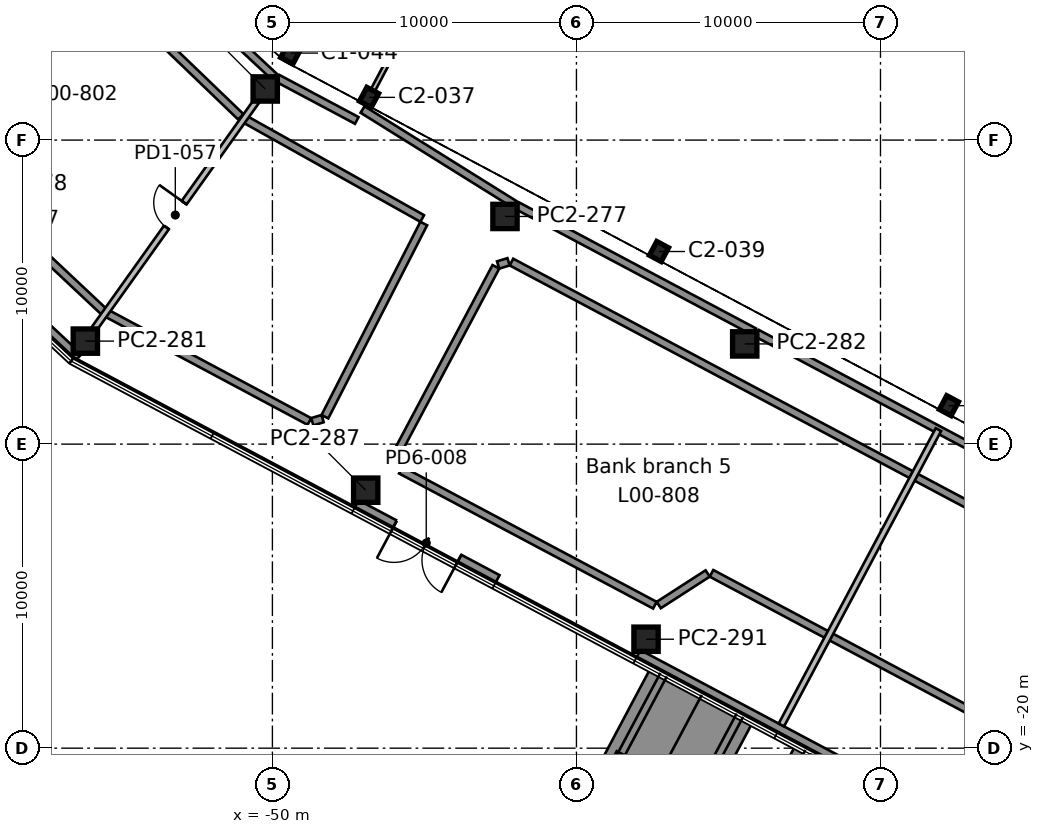
"""IFC4 building model, lengths in metres.
Left out: names, types, materials, properties, quantities, classifications, styles, units other than length and angle.
Written with IfcOpenShell. Run it as: python <this file> out.ifc"""

import sys

from ifc_helpers import new_model, si_unit, direction, frame, frame_2d, origin, origin_2d, place, context, subcontext, project, spatial, rectangle, i_section, extrude, element, fill, save


model = new_model("IFC4")
c1 = context("Model", 3, precision=1e-05, world=origin(), true_north=direction((0.0, 1.0)))
c2 = subcontext(c1, "Body", "Model", "MODEL_VIEW")
j1 = project(units=[si_unit("LENGTHUNIT", "METRE"), si_unit("PLANEANGLEUNIT", "RADIAN")], contexts=[c1])
p1 = place(None, origin())
s1 = spatial("IfcSite", under=j1, at=p1, CompositionType="ELEMENT")
p2 = place(p1, origin())
s2 = spatial("IfcBuilding", under=s1, at=p2, CompositionType="ELEMENT")
p3 = place(p2, origin())
s3 = spatial("IfcBuildingStorey", under=s2, at=p3, CompositionType="ELEMENT", Elevation=0.0)
for number, where, z_axis, x_axis in (
    (1, (-27.749, -8.735, 0.0), (0.0, 0.0, 1.0), (0.883, -0.469, 0.0)),
    (2, (-37.285, -3.665, 0.0), (0.0, 0.0, 1.0), (0.883, -0.469, 0.0)),
    (3, (-46.821, 1.405, 0.0), (0.0, 0.0, 1.0), (0.883, -0.469, 0.0)),
):
    element("IfcColumn", number, at=place(p3, frame(where, z_axis=z_axis, x_axis=x_axis)), inside=s3, PredefinedType="COLUMN", context=c2, shape_type="SweptSolid", body=[
        extrude(i_section(OverallWidth=0.437, OverallDepth=0.513, WebThickness=0.061, FlangeThickness=0.097, FilletRadius=0.015, at=origin_2d()), origin(), (0.0, 0.0, 1.0), 7.0),
    ])
p4 = place(p3, frame((-49.394, 2.861, 0.0), z_axis=(0.0, 0.0, 1.0), x_axis=(0.882947592859, -0.469471562786, 0.0)))
e4 = element("IfcColumn", 4, at=p4, inside=s3, PredefinedType="COLUMN", context=c2, shape_type="SweptSolid", body=[
    extrude(i_section(OverallWidth=0.455, OverallDepth=0.569, WebThickness=0.078, FlangeThickness=0.125, FilletRadius=0.015, at=origin_2d()), origin(), (0.0, 0.0, 1.0), 7.0),
])
p5 = place(p3, frame((-22.937, 1.38, 0.0), z_axis=(0.0, 0.0, 1.0), x_axis=(-0.88295276571, 0.46946183394, 0.0)))
e5 = element("IfcWall", 5, at=p5, inside=s3, PredefinedType="SHEAR", context=c2, shape_type="SweptSolid", body=[
    extrude(rectangle(XDim=20.2, YDim=0.9, at=frame_2d((10.1, 0.0))), origin(), (0.0, 0.0, 1.0), 7.0),
])
for number, where, z_axis, x_axis in (
    (6, (-37.711, -16.417, 0.0), (0.0, 0.0, 1.0), (1.0, 0.0, 0.0)),
    (7, (-46.931, -11.515, 0.0), (0.0, 0.0, 1.0), (1.0, 0.0, 0.0)),
    (8, (-34.465, -6.704, 0.0), (0.0, 0.0, 1.0), (1.0, 0.0, 0.0)),
    (9, (-56.152, -6.612, 0.0), (0.0, 0.0, 1.0), (1.0, 0.0, 0.0)),
    (10, (-42.35, -2.512, 0.0), (0.0, 0.0, 1.0), (1.0, 0.0, 0.0)),
    (11, (-50.236, 1.681, 0.0), (0.0, 0.0, 1.0), (1.0, 0.0, 0.0)),
):
    element("IfcColumn", number, at=place(p3, frame(where, z_axis=z_axis, x_axis=x_axis)), inside=s3, PredefinedType="COLUMN", context=c2, shape_type="SweptSolid", body=[
        extrude(rectangle(XDim=0.8, YDim=0.8, at=origin_2d()), origin(), (0.0, 0.0, 1.0), 6.37),
    ])
p6 = place(p3, frame((-67.902, 3.524, 0.0), z_axis=(0.0, 0.0, 1.0), x_axis=(0.731345713801, -0.682006925848, 0.0)))
e12 = element("IfcWall", 12, at=p6, inside=s3, PredefinedType="SOLIDWALL", context=c2, shape_type="SweptSolid", body=[
    extrude(rectangle(XDim=15.706, YDim=0.4, at=frame_2d((7.853, 0.0))), origin(), (0.0, 0.0, 1.0), 6.37),
])
p7 = place(p6, frame((1.357, 0.0, 0.0)))
e13 = element("IfcOpeningElement", 13, at=p7, cuts=e12, PredefinedType="OPENING", context=c2, shape_type="SweptSolid", body=[
    extrude(rectangle(XDim=2.4, YDim=2.4, at=frame_2d((1.2, 1.2))), frame((0.0, 0.21, 0.0), z_axis=(0.0, -1.0, 0.0), x_axis=(1.0, 0.0, 0.0)), (0.0, 0.0, 1.0), 0.42),
])
p8 = place(p6, frame((6.579, 0.0, 0.0)))
e14 = element("IfcOpeningElement", 14, at=p8, cuts=e12, PredefinedType="OPENING", context=c2, shape_type="SweptSolid", body=[
    extrude(rectangle(XDim=2.4, YDim=2.4, at=frame_2d((1.2, 1.2))), frame((0.0, 0.21, 0.0), z_axis=(0.0, -1.0, 0.0), x_axis=(1.0, 0.0, 0.0)), (0.0, 0.0, 1.0), 0.42),
])
p9 = place(p6, frame((11.801, 0.0, 0.0)))
e15 = element("IfcOpeningElement", 15, at=p9, cuts=e12, PredefinedType="OPENING", context=c2, shape_type="SweptSolid", body=[
    extrude(rectangle(XDim=2.4, YDim=2.4, at=frame_2d((1.2, 1.2))), frame((0.0, 0.21, 0.0), z_axis=(0.0, -1.0, 0.0), x_axis=(1.0, 0.0, 0.0)), (0.0, 0.0, 1.0), 0.42),
])
p10 = place(p3, frame((-47.257, -12.021, 0.0), z_axis=(0.0, 0.0, 1.0), x_axis=(0.882945827299, -0.469474883307, 0.0)))
e16 = element("IfcWall", 16, at=p10, inside=s3, PredefinedType="SOLIDWALL", context=c2, shape_type="SweptSolid", body=[
    extrude(rectangle(XDim=5.249, YDim=0.4, at=frame_2d((2.624, 0.0))), origin(), (0.0, 0.0, 1.0), 6.37),
])
p11 = place(p10, frame((1.425, 0.0, 0.0)))
e17 = element("IfcOpeningElement", 17, at=p11, cuts=e16, PredefinedType="OPENING", context=c2, shape_type="SweptSolid", body=[
    extrude(rectangle(XDim=2.4, YDim=2.4, at=frame_2d((1.2, 1.2))), frame((0.0, 0.21, 0.0), z_axis=(0.0, -1.0, 0.0), x_axis=(1.0, 0.0, 0.0)), (0.0, 0.0, 1.0), 0.42),
])
p12 = place(p3, frame((-37.988, -16.95, 0.0), z_axis=(0.0, 0.0, 1.0), x_axis=(0.882951258831, -0.469464668029, 0.0)))
e18 = element("IfcWall", 18, at=p12, inside=s3, PredefinedType="SOLIDWALL", context=c2, shape_type="SweptSolid", body=[
    extrude(rectangle(XDim=20.996, YDim=0.4, at=frame_2d((10.498, 0.0))), origin(), (0.0, 0.0, 1.0), 6.37),
])
p13 = place(p12, frame((17.171, 0.0, 0.0)))
e19 = element("IfcOpeningElement", 19, at=p13, cuts=e18, PredefinedType="OPENING", context=c2, shape_type="SweptSolid", body=[
    extrude(rectangle(XDim=2.4, YDim=2.4, at=frame_2d((1.2, 1.2))), frame((0.0, 0.21, 0.0), z_axis=(0.0, -1.0, 0.0), x_axis=(1.0, 0.0, 0.0)), (0.0, 0.0, 1.0), 0.42),
])
p14 = place(p3, frame((-36.605, -17.912, 0.0), z_axis=(0.0, 0.0, 1.0), x_axis=(-0.469411791251, -0.882979371353, 0.0)))
e20 = element("IfcWall", 20, at=p14, inside=s3, PredefinedType="SOLIDWALL", context=c2, shape_type="SweptSolid", body=[
    extrude(rectangle(XDim=3.2, YDim=1.6, at=frame_2d((1.6, 0.0))), origin(), (0.0, 0.0, 1.0), 6.75),
])
p15 = place(p3, frame((-35.192, -18.663, 0.0), z_axis=(0.0, 0.0, 1.0), x_axis=(-0.469471267677, -0.882947749771, 0.0)))
e21 = element("IfcWall", 21, at=p15, inside=s3, PredefinedType="SOLIDWALL", context=c2, shape_type="SweptSolid", body=[
    extrude(rectangle(XDim=1.6, YDim=1.6, at=frame_2d((0.8, 0.0))), origin(), (0.0, 0.0, 1.0), 6.75),
])
p16 = place(p3, frame((-35.943, -20.076, 0.0), z_axis=(0.0, 0.0, 1.0), x_axis=(-0.469534519898, -0.882914115089, 0.0)))
e22 = element("IfcWall", 22, at=p16, inside=s3, PredefinedType="SOLIDWALL", context=c2, shape_type="SweptSolid", body=[
    extrude(rectangle(XDim=1.6, YDim=1.6, at=frame_2d((0.8, 0.0))), origin(), (0.0, 0.0, 1.0), 6.75),
])
p17 = place(p3, frame((-37.444, -17.466, 0.0), z_axis=(0.0, 0.0, 1.0), x_axis=(-0.469434248776, -0.882967432059, 0.0)))
e23 = element("IfcWall", 23, at=p17, inside=s3, PredefinedType="SOLIDWALL", context=c2, shape_type="SweptSolid", body=[
    extrude(rectangle(XDim=2.9, YDim=0.3, at=frame_2d((1.45, 0.0))), origin(), (0.0, 0.0, 1.0), 7.0),
])
p18 = place(p3, frame((-38.805, -20.026, 0.0), z_axis=(0.0, 0.0, 1.0), x_axis=(-0.469534121713, -0.882914326844, 0.0)))
e24 = element("IfcWall", 24, at=p18, inside=s3, PredefinedType="SOLIDWALL", context=c2, shape_type="SweptSolid", body=[
    extrude(rectangle(XDim=1.9, YDim=0.3, at=frame_2d((0.95, 0.0))), origin(), (0.0, 0.0, 1.0), 7.0),
])
p19 = place(p3, frame((-34.353, -19.109, 0.0), z_axis=(0.0, 0.0, 1.0), x_axis=(-0.469434248776, -0.882967432059, 0.0)))
e25 = element("IfcWall", 25, at=p19, inside=s3, PredefinedType="SOLIDWALL", context=c2, shape_type="SweptSolid", body=[
    extrude(rectangle(XDim=2.9, YDim=0.3, at=frame_2d((1.45, 0.0))), origin(), (0.0, 0.0, 1.0), 7.0),
])
p20 = place(p3, frame((-31.837, -20.447, 0.0), z_axis=(0.0, 0.0, 1.0), x_axis=(-0.46947503999, -0.882945743988, 0.0)))
e26 = element("IfcWall", 26, at=p20, inside=s3, PredefinedType="SOLIDWALL", context=c2, shape_type="SweptSolid", body=[
    extrude(rectangle(XDim=3.2, YDim=1.6, at=frame_2d((1.6, 0.0))), origin(), (0.0, 0.0, 1.0), 6.75),
])
p21 = place(p3, frame((-32.676, -20.001, 0.0), z_axis=(0.0, 0.0, 1.0), x_axis=(-0.469534780786, -0.882913976349, 0.0)))
e27 = element("IfcWall", 27, at=p21, inside=s3, PredefinedType="SOLIDWALL", context=c2, shape_type="SweptSolid", body=[
    extrude(rectangle(XDim=2.9, YDim=0.3, at=frame_2d((1.45, 0.0))), origin(), (0.0, 0.0, 1.0), 7.0),
])
p22 = place(p3, frame((-23.159, -20.845, 7.0), z_axis=(0.0, 0.0, 1.0), x_axis=(-0.882863954687, 0.469628829518, 0.0)))
e28 = element("IfcWall", 28, at=p22, inside=s3, PredefinedType="STANDARD", context=c2, shape_type="SweptSolid", body=[
    extrude(rectangle(XDim=14.044, YDim=0.25, at=frame_2d((7.022, 0.0))), origin(), (0.0, 0.0, 1.0), 0.65),
])
p23 = place(p3, frame((-35.684, -14.255, 7.0), z_axis=(0.0, 0.0, 1.0), x_axis=(-0.840369713359, -0.542013602107, 0.0)))
e29 = element("IfcWall", 29, at=p23, inside=s3, PredefinedType="STANDARD", context=c2, shape_type="SweptSolid", body=[
    extrude(rectangle(XDim=1.915, YDim=0.25, at=frame_2d((0.958, 0.0))), origin(), (0.0, 0.0, 1.0), 0.65),
])
p24 = place(p3, frame((-37.42, -15.298, 7.0), z_axis=(0.0, 0.0, 1.0), x_axis=(-0.882939968374, 0.469485902076, 0.0)))
e30 = element("IfcWall", 30, at=p24, inside=s3, PredefinedType="STANDARD", context=c2, shape_type="SweptSolid", body=[
    extrude(rectangle(XDim=9.464, YDim=0.25, at=frame_2d((4.732, 0.0))), origin(), (0.0, 0.0, 1.0), 0.65),
])
p25 = place(p3, frame((-45.837, -10.781, 7.0), z_axis=(0.0, 0.0, 1.0), x_axis=(-0.292218535599, 0.956351571051, 0.0)))
e31 = element("IfcWall", 31, at=p25, inside=s3, PredefinedType="STANDARD", context=c2, shape_type="SweptSolid", body=[
    extrude(rectangle(XDim=0.358, YDim=0.25, at=frame_2d((0.179, 0.0))), origin(), (0.0, 0.0, 1.0), 0.65),
])
p26 = place(p3, frame((-45.932, -10.343, 7.0), z_axis=(0.0, 0.0, 1.0), x_axis=(0.469458954787, 0.882954296535, 0.0)))
e32 = element("IfcWall", 32, at=p26, inside=s3, PredefinedType="STANDARD", context=c2, shape_type="SweptSolid", body=[
    extrude(rectangle(XDim=6.993, YDim=0.25, at=frame_2d((3.497, 0.0))), origin(), (0.0, 0.0, 1.0), 0.65),
])
p27 = place(p3, frame((-42.576, -4.108, 7.0), z_axis=(0.0, 0.0, 1.0), x_axis=(0.956409679833, 0.2920282937, 0.0)))
e33 = element("IfcWall", 33, at=p27, inside=s3, PredefinedType="STANDARD", context=c2, shape_type="SweptSolid", body=[
    extrude(rectangle(XDim=0.359, YDim=0.25, at=frame_2d((0.179, 0.0))), origin(), (0.0, 0.0, 1.0), 0.65),
])
p28 = place(p3, frame((-42.137, -4.012, 7.0), z_axis=(0.0, 0.0, 1.0), x_axis=(0.882945698561, -0.469475125424, 0.0)))
e34 = element("IfcWall", 34, at=p28, inside=s3, PredefinedType="STANDARD", context=c2, shape_type="SweptSolid", body=[
    extrude(rectangle(XDim=28.492, YDim=0.25, at=frame_2d((14.246, 0.0))), origin(), (0.0, 0.0, 1.0), 0.65),
])
p29 = place(p3, frame((-48.348, -9.161, 7.0), z_axis=(0.0, 0.0, 1.0), x_axis=(-0.956340919112, -0.292253394219, 0.0)))
e35 = element("IfcWall", 35, at=p29, inside=s3, PredefinedType="STANDARD", context=c2, shape_type="SweptSolid", body=[
    extrude(rectangle(XDim=0.356, YDim=0.25, at=frame_2d((0.178, 0.0))), origin(), (0.0, 0.0, 1.0), 0.65),
])
p30 = place(p3, frame((-48.784, -9.255, 7.0), z_axis=(0.0, 0.0, 1.0), x_axis=(-0.882115498976, 0.471033169178, 0.0)))
e36 = element("IfcWall", 36, at=p30, inside=s3, PredefinedType="STANDARD", context=c2, shape_type="SweptSolid", body=[
    extrude(rectangle(XDim=7.632, YDim=0.25, at=frame_2d((3.816, 0.0))), origin(), (0.0, 0.0, 1.0), 0.65),
])
p31 = place(p3, frame((-55.543, -5.642, 7.0), z_axis=(0.0, 0.0, 1.0), x_axis=(-0.728908334125, 0.684611306102, 0.0)))
e37 = element("IfcWall", 37, at=p31, inside=s3, PredefinedType="STANDARD", context=c2, shape_type="SweptSolid", body=[
    extrude(rectangle(XDim=14.886, YDim=0.25, at=frame_2d((7.443, 0.0))), origin(), (0.0, 0.0, 1.0), 0.65),
])
p32 = place(p3, frame((-59.649, 9.039, 7.0), z_axis=(0.0, 0.0, 1.0), x_axis=(0.721064848091, -0.692867581034, 0.0)))
e38 = element("IfcWall", 38, at=p32, inside=s3, PredefinedType="STANDARD", context=c2, shape_type="SweptSolid", body=[
    extrude(rectangle(XDim=11.94, YDim=0.25, at=frame_2d((5.97, 0.0))), origin(), (0.0, 0.0, 1.0), 0.65),
])
p33 = place(p3, frame((-51.014, 0.747, 7.0), z_axis=(0.0, 0.0, 1.0), x_axis=(0.872584878438, -0.488462516394, 0.0)))
e39 = element("IfcWall", 39, at=p33, inside=s3, PredefinedType="STANDARD", context=c2, shape_type="SweptSolid", body=[
    extrude(rectangle(XDim=6.809, YDim=0.25, at=frame_2d((3.405, 0.0))), origin(), (0.0, 0.0, 1.0), 0.65),
])
p34 = place(p3, frame((-45.022, -2.745, 7.0), z_axis=(0.0, 0.0, 1.0), x_axis=(-0.455581724092, -0.890193963512, 0.0)))
e40 = element("IfcWall", 40, at=p34, inside=s3, PredefinedType="STANDARD", context=c2, shape_type="SweptSolid", body=[
    extrude(rectangle(XDim=7.137, YDim=0.25, at=frame_2d((3.568, 0.0))), origin(), (0.0, 0.0, 1.0), 0.65),
])
p35 = place(p3, frame((-33.26, -19.237, 0.0), z_axis=(0.0, 0.0, 1.0), x_axis=(0.469463523634, 0.882951867305, 0.0)))
e41 = element("IfcWall", 41, at=p35, inside=s3, PredefinedType="PARTITIONING", context=c2, shape_type="SweptSolid", body=[
    extrude(rectangle(XDim=11.0, YDim=0.2, at=frame_2d((5.5, 0.0))), origin(), (0.0, 0.0, 1.0), 6.37),
])
p36 = place(p3, frame((-47.224, 0.646, 0.0), z_axis=(0.0, 0.0, 1.0), x_axis=(-0.882766080441, 0.469812778905, 0.0)))
e42 = element("IfcWall", 42, at=p36, inside=s3, PredefinedType="SOLIDWALL", context=c2, shape_type="SweptSolid", body=[
    extrude(rectangle(XDim=2.958, YDim=0.25, at=frame_2d((1.479, 0.0))), origin(), (0.0, 0.0, 1.0), 6.37),
])
p37 = place(p3, frame((-28.092, -9.527, 0.0), z_axis=(0.0, 0.0, 1.0), x_axis=(-0.882951650701, 0.469463931016, 0.0)))
e43 = element("IfcWall", 43, at=p37, inside=s3, PredefinedType="SOLIDWALL", context=c2, shape_type="SweptSolid", body=[
    extrude(rectangle(XDim=6.765, YDim=0.25, at=frame_2d((3.382, 0.0))), origin(), (0.0, 0.0, 1.0), 6.37),
])
p38 = place(p3, frame((-34.153, -6.304, 0.0), z_axis=(0.0, 0.0, 1.0), x_axis=(-0.882943838539, 0.469478623567, 0.0)))
e44 = element("IfcWall", 44, at=p38, inside=s3, PredefinedType="SOLIDWALL", context=c2, shape_type="SweptSolid", body=[
    extrude(rectangle(XDim=8.831, YDim=0.25, at=frame_2d((4.415, 0.0))), origin(), (0.0, 0.0, 1.0), 6.37),
])
p39 = place(p3, frame((-42.037, -2.112, 0.0), z_axis=(0.0, 0.0, 1.0), x_axis=(-0.848449825707, 0.529275819642, 0.0)))
e45 = element("IfcWall", 45, at=p39, inside=s3, PredefinedType="SOLIDWALL", context=c2, shape_type="SweptSolid", body=[
    extrude(rectangle(XDim=5.889, YDim=0.25, at=frame_2d((2.945, 0.0))), origin(), (0.0, 0.0, 1.0), 6.37),
])
p40 = place(p3, frame((-50.521, 1.281, 0.0), z_axis=(0.0, 0.0, 1.0), x_axis=(-0.580708624763, -0.814111474631, 0.0)))
e46 = element("IfcWall", 46, at=p40, inside=s3, PredefinedType="PARTITIONING", context=c2, shape_type="SweptSolid", body=[
    extrude(rectangle(XDim=9.204, YDim=0.2, at=frame_2d((4.602, 0.0))), origin(), (0.0, 0.0, 1.0), 6.37),
])
p41 = place(p40, frame((4.102, 0.0, 0.0)))
e47 = element("IfcOpeningElement", 47, at=p41, cuts=e46, PredefinedType="OPENING", context=c2, shape_type="SweptSolid", body=[
    extrude(rectangle(XDim=1.0, YDim=2.1, at=frame_2d((0.5, 1.05))), frame((0.0, 0.11, 0.0), z_axis=(0.0, -1.0, 0.0), x_axis=(1.0, 0.0, 0.0)), (0.0, 0.0, 1.0), 0.22),
])
p42 = place(p3, frame((-26.267, -10.497, 0.0), z_axis=(0.0, 0.0, 1.0), x_axis=(-0.882964142915, 0.469440435335, 0.0)))
e48 = element("IfcWall", 48, at=p42, inside=s3, PredefinedType="SOLIDWALL", context=c2, shape_type="SweptSolid", body=[
    extrude(rectangle(XDim=2.065, YDim=0.25, at=frame_2d((1.033, 0.0))), origin(), (0.0, 0.0, 1.0), 6.37),
])
p43 = place(p3, frame((-46.7, 1.632, 0.0), z_axis=(0.0, 0.0, 1.0), x_axis=(0.46948131983, 0.882942404878, 0.0)))
e49 = element("IfcWall", 49, at=p43, inside=s3, PredefinedType="PARTITIONING", context=c2, shape_type="SweptSolid", body=[
    extrude(rectangle(XDim=9.688, YDim=0.15, at=frame_2d((4.844, 0.0))), origin(), (0.0, 0.0, 1.0), 6.55),
])
p44 = place(p43, frame((4.443, 0.0, 0.0)))
e50 = element("IfcOpeningElement", 50, at=p44, cuts=e49, PredefinedType="OPENING", context=c2, shape_type="SweptSolid", body=[
    extrude(rectangle(XDim=1.0, YDim=2.1, at=frame_2d((0.5, 1.05))), frame((0.0, 0.085, 0.0), z_axis=(0.0, -1.0, 0.0), x_axis=(1.0, 0.0, 0.0)), (0.0, 0.0, 1.0), 0.17),
])
p45 = place(p3, frame((-53.972, 5.849, 0.0), z_axis=(0.0, 0.0, 1.0), x_axis=(0.731317536597, -0.682037140239, 0.0)))
e51 = element("IfcWall", 51, at=p45, inside=s3, PredefinedType="SOLIDWALL", context=c2, shape_type="SweptSolid", body=[
    extrude(rectangle(XDim=5.509, YDim=0.25, at=frame_2d((2.754, 0.0))), origin(), (0.0, 0.0, 1.0), 6.37),
])
p46 = place(p11, frame((2.4, 0.0, 0.0), z_axis=(0.0, 0.0, 1.0), x_axis=(-1.0, 0.0, 0.0)))
e52 = element("IfcDoor", 52, at=p46, inside=s3, OperationType="DOUBLE_DOOR_SINGLE_SWING", PredefinedType="DOOR", context=c2, shape_type="SweptSolid", body=[
    extrude(rectangle(XDim=2.4, YDim=2.4, at=frame_2d((1.2, 1.2))), frame((0.0, 0.025, 0.0), z_axis=(0.0, -1.0, 0.0), x_axis=(1.0, 0.0, 0.0)), (0.0, 0.0, 1.0), 0.05),
])
fill(e17, e52)
p47 = place(p41, frame((1.0, 0.0, 0.0), z_axis=(0.0, 0.0, 1.0), x_axis=(-1.0, 0.0, 0.0)))
e53 = element("IfcDoor", 53, at=p47, inside=s3, OperationType="SINGLE_SWING_RIGHT", PredefinedType="DOOR", context=c2, shape_type="SweptSolid", body=[
    extrude(rectangle(XDim=1.0, YDim=2.1, at=frame_2d((0.5, 1.05))), frame((0.0, 0.025, 0.0), z_axis=(0.0, -1.0, 0.0), x_axis=(1.0, 0.0, 0.0)), (0.0, 0.0, 1.0), 0.05),
])
fill(e47, e53)
save(model, sys.argv[1])
